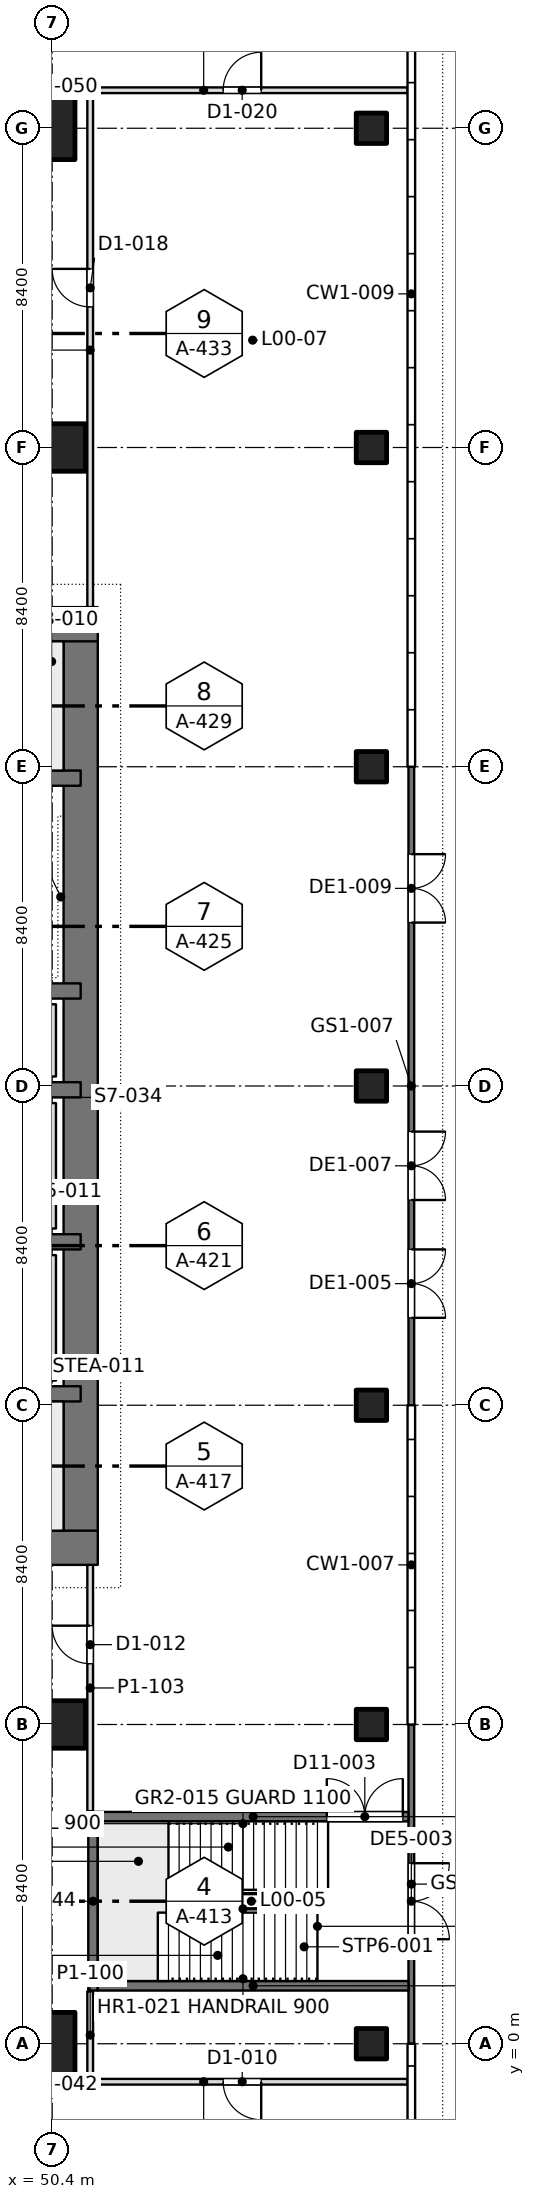
"""IFC4 building model, lengths in metres.
Left out: names, types, materials, properties, quantities, classifications, styles, units other than length and angle.
Written with IfcOpenShell. Run it as: python <this file> out.ifc"""

import sys

from ifc_helpers import new_model, si_unit, direction, frame, frame_2d, origin, origin_2d, place, context, subcontext, project, spatial, rectangle, extrude, element, fill, save


model = new_model("IFC4")
c1 = context("Model", 3, precision=1e-05, world=origin(), true_north=direction((0.0, 1.0)))
c2 = subcontext(c1, "Body", "Model", "MODEL_VIEW")
j1 = project(units=[si_unit("LENGTHUNIT", "METRE"), si_unit("PLANEANGLEUNIT", "RADIAN")], contexts=[c1])
p1 = place(None, origin())
s1 = spatial("IfcSite", under=j1, at=p1, CompositionType="ELEMENT")
p2 = place(p1, origin())
s2 = spatial("IfcBuilding", under=s1, at=p2, CompositionType="ELEMENT")
p3 = place(p2, origin())
s3 = spatial("IfcBuildingStorey", under=s2, at=p3, CompositionType="ELEMENT", Elevation=0.0)
p4 = place(p3, frame((50.4, 0.0, 0.0), z_axis=(0.0, 0.0, 1.0), x_axis=(1.0, 0.0, 0.0)))
e1 = element("IfcColumn", 1, at=p4, inside=s3, PredefinedType="COLUMN", context=c2, shape_type="SweptSolid", body=[
    extrude(rectangle(XDim=1.2, YDim=1.65, at=origin_2d()), origin(), (0.0, 0.0, 1.0), 5.4),
])
for number, where, z_axis, x_axis in (
    (2, (50.4, 8.4, 0.0), (0.0, 0.0, 1.0), (0.0, 1.0, 0.0)),
    (3, (50.4, 42.0, 0.0), (0.0, 0.0, 1.0), (0.0, 1.0, 0.0)),
):
    element("IfcColumn", number, at=place(p3, frame(where, z_axis=z_axis, x_axis=x_axis)), inside=s3, PredefinedType="COLUMN", context=c2, shape_type="SweptSolid", body=[
        extrude(rectangle(XDim=1.25, YDim=1.75, at=origin_2d()), origin(), (0.0, 0.0, 1.0), 5.4),
    ])
p5 = place(p3, frame((50.4, 50.4, 0.0), z_axis=(0.0, 0.0, 1.0), x_axis=(1.0, 0.0, 0.0)))
e4 = element("IfcColumn", 4, at=p5, inside=s3, PredefinedType="COLUMN", context=c2, shape_type="SweptSolid", body=[
    extrude(rectangle(XDim=1.2, YDim=1.65, at=origin_2d()), origin(), (0.0, 0.0, 1.0), 5.4),
])
for number, where, z_axis, x_axis in (
    (5, (58.8, 0.0, 0.0), (0.0, 0.0, 1.0), (1.0, 0.0, 0.0)),
    (6, (58.8, 8.4, 0.0), (0.0, 0.0, 1.0), (1.0, 0.0, 0.0)),
    (7, (58.8, 16.8, 0.0), (0.0, 0.0, 1.0), (1.0, 0.0, 0.0)),
    (8, (58.8, 25.2, 0.0), (0.0, 0.0, 1.0), (1.0, 0.0, 0.0)),
    (9, (58.8, 33.6, 0.0), (0.0, 0.0, 1.0), (1.0, 0.0, 0.0)),
    (10, (58.8, 42.0, 0.0), (0.0, 0.0, 1.0), (1.0, 0.0, 0.0)),
    (11, (58.8, 50.4, 0.0), (0.0, 0.0, 1.0), (1.0, 0.0, 0.0)),
):
    element("IfcColumn", number, at=place(p3, frame(where, z_axis=z_axis, x_axis=x_axis)), inside=s3, PredefinedType="COLUMN", context=c2, shape_type="SweptSolid", body=[
        extrude(rectangle(XDim=0.8, YDim=0.8, at=origin_2d()), origin(), (0.0, 0.0, 1.0), 5.4),
    ])
p6 = place(p3, frame((33.6, 13.05, 0.0), z_axis=(0.0, 0.0, 1.0), x_axis=(1.0, 0.0, 0.0)))
e12 = element("IfcWall", 12, at=p6, inside=s3, PredefinedType="SHEAR", context=c2, shape_type="SweptSolid", body=[
    extrude(rectangle(XDim=18.0, YDim=0.9, at=frame_2d((9.0, 0.0))), origin(), (0.0, 0.0, 1.0), 5.4),
])
p7 = place(p6, frame((7.25, 0.0, 0.0)))
e13 = element("IfcOpeningElement", 13, at=p7, cuts=e12, PredefinedType="OPENING", context=c2, shape_type="SweptSolid", body=[
    extrude(rectangle(XDim=1.8, YDim=2.4, at=frame_2d((0.9, 1.2))), frame((0.0, 0.46, 0.0), z_axis=(0.0, -1.0, 0.0), x_axis=(1.0, 0.0, 0.0)), (0.0, 0.0, 1.0), 0.92),
])
p8 = place(p3, frame((33.6, 37.35, 0.0), z_axis=(0.0, 0.0, 1.0), x_axis=(1.0, 0.0, 0.0)))
e14 = element("IfcWall", 14, at=p8, inside=s3, PredefinedType="SHEAR", context=c2, shape_type="SweptSolid", body=[
    extrude(rectangle(XDim=18.0, YDim=0.9, at=frame_2d((9.0, 0.0))), origin(), (0.0, 0.0, 1.0), 5.4),
])
p9 = place(p8, frame((7.25, 0.0, 0.0)))
e15 = element("IfcOpeningElement", 15, at=p9, cuts=e14, PredefinedType="OPENING", context=c2, shape_type="SweptSolid", body=[
    extrude(rectangle(XDim=1.8, YDim=2.4, at=frame_2d((0.9, 1.2))), frame((0.0, 0.46, 0.0), z_axis=(0.0, -1.0, 0.0), x_axis=(1.0, 0.0, 0.0)), (0.0, 0.0, 1.0), 0.92),
])
p10 = place(p3, frame((51.15, 13.05, 0.0), z_axis=(0.0, 0.0, 1.0), x_axis=(0.0, 1.0, 0.0)))
e16 = element("IfcWall", 16, at=p10, inside=s3, PredefinedType="SHEAR", context=c2, shape_type="SweptSolid", body=[
    extrude(rectangle(XDim=24.3, YDim=0.9, at=frame_2d((12.15, 0.0))), origin(), (0.0, 0.0, 1.0), 5.4),
])
for number, where, z_axis, x_axis in (
    (17, (51.15, 17.1, 0.0), (0.0, 0.0, 1.0), (-1.0, 0.0, 0.0)),
    (18, (51.15, 21.1, 0.0), (0.0, 0.0, 1.0), (-1.0, 0.0, 0.0)),
    (19, (51.15, 25.1, 0.0), (0.0, 0.0, 1.0), (-1.0, 0.0, 0.0)),
    (20, (51.15, 27.7, 0.0), (0.0, 0.0, 1.0), (-1.0, 0.0, 0.0)),
    (21, (51.15, 33.3, 0.0), (0.0, 0.0, 1.0), (-1.0, 0.0, 0.0)),
):
    element("IfcWall", number, at=place(p3, frame(where, z_axis=z_axis, x_axis=x_axis)), inside=s3, PredefinedType="SHEAR", context=c2, shape_type="SweptSolid", body=[
        extrude(rectangle(XDim=7.65, YDim=0.4, at=frame_2d((3.825, 0.0))), origin(), (0.0, 0.0, 1.0), 5.4),
    ])
p11 = place(p3, frame((59.85, 0.0, 0.0), z_axis=(0.0, 0.0, 1.0), x_axis=(0.0, 1.0, 0.0)))
e22 = element("IfcWall", 22, at=p11, inside=s3, PredefinedType="SOLIDWALL", context=c2, shape_type="SweptSolid", body=[
    extrude(rectangle(XDim=8.4, YDim=0.15, at=frame_2d((4.2, 0.0))), origin(), (0.0, 0.0, 1.0), 5.2),
])
p12 = place(p11, frame((2.75, 0.0, 0.0)))
e23 = element("IfcOpeningElement", 23, at=p12, cuts=e22, PredefinedType="OPENING", context=c2, shape_type="SweptSolid", body=[
    extrude(rectangle(XDim=2.0, YDim=2.4, at=frame_2d((1.0, 1.2))), frame((0.0, 0.085, 0.0), z_axis=(0.0, -1.0, 0.0), x_axis=(1.0, 0.0, 0.0)), (0.0, 0.0, 1.0), 0.17),
])
p13 = place(p3, frame((59.85, 16.8, 0.0), z_axis=(0.0, 0.0, 1.0), x_axis=(0.0, 1.0, 0.0)))
e24 = element("IfcWall", 24, at=p13, inside=s3, PredefinedType="SOLIDWALL", context=c2, shape_type="SweptSolid", body=[
    extrude(rectangle(XDim=16.8, YDim=0.15, at=frame_2d((8.4, 0.0))), origin(), (0.0, 0.0, 1.0), 5.2),
])
p14 = place(p13, frame((2.3, 0.0, 0.0)))
e25 = element("IfcOpeningElement", 25, at=p14, cuts=e24, PredefinedType="OPENING", context=c2, shape_type="SweptSolid", body=[
    extrude(rectangle(XDim=1.8, YDim=2.4, at=frame_2d((0.9, 1.2))), frame((0.0, 0.085, 0.0), z_axis=(0.0, -1.0, 0.0), x_axis=(1.0, 0.0, 0.0)), (0.0, 0.0, 1.0), 0.17),
])
p15 = place(p13, frame((5.4, 0.0, 0.0)))
e26 = element("IfcOpeningElement", 26, at=p15, cuts=e24, PredefinedType="OPENING", context=c2, shape_type="SweptSolid", body=[
    extrude(rectangle(XDim=1.8, YDim=2.4, at=frame_2d((0.9, 1.2))), frame((0.0, 0.085, 0.0), z_axis=(0.0, -1.0, 0.0), x_axis=(1.0, 0.0, 0.0)), (0.0, 0.0, 1.0), 0.17),
])
p16 = place(p13, frame((12.7, 0.0, 0.0)))
e27 = element("IfcOpeningElement", 27, at=p16, cuts=e24, PredefinedType="OPENING", context=c2, shape_type="SweptSolid", body=[
    extrude(rectangle(XDim=1.8, YDim=2.4, at=frame_2d((0.9, 1.2))), frame((0.0, 0.085, 0.0), z_axis=(0.0, -1.0, 0.0), x_axis=(1.0, 0.0, 0.0)), (0.0, 0.0, 1.0), 0.17),
])
p17 = place(p3, frame((49.02, -1.0, 0.0), z_axis=(0.0, 0.0, 1.0), x_axis=(1.0, 0.0, 0.0)))
e28 = element("IfcWall", 28, at=p17, inside=s3, PredefinedType="PARTITIONING", context=c2, shape_type="SweptSolid", body=[
    extrude(rectangle(XDim=10.732, YDim=0.15, at=frame_2d((5.366, 0.0))), origin(), (0.0, 0.0, 1.0), 4.6),
])
p18 = place(p17, frame((5.88, 0.0, 0.0)))
e29 = element("IfcOpeningElement", 29, at=p18, cuts=e28, PredefinedType="OPENING", context=c2, shape_type="SweptSolid", body=[
    extrude(rectangle(XDim=1.0, YDim=2.2, at=frame_2d((0.5, 1.1))), frame((0.0, 0.085, 0.0), z_axis=(0.0, -1.0, 0.0), x_axis=(1.0, 0.0, 0.0)), (0.0, 0.0, 1.0), 0.17),
])
p19 = place(p3, frame((49.02, 51.4, 0.0), z_axis=(0.0, 0.0, 1.0), x_axis=(1.0, 0.0, 0.0)))
e30 = element("IfcWall", 30, at=p19, inside=s3, PredefinedType="PARTITIONING", context=c2, shape_type="SweptSolid", body=[
    extrude(rectangle(XDim=10.732, YDim=0.15, at=frame_2d((5.366, 0.0))), origin(), (0.0, 0.0, 1.0), 4.6),
])
p20 = place(p19, frame((5.88, 0.0, 0.0)))
e31 = element("IfcOpeningElement", 31, at=p20, cuts=e30, PredefinedType="OPENING", context=c2, shape_type="SweptSolid", body=[
    extrude(rectangle(XDim=1.0, YDim=2.2, at=frame_2d((0.5, 1.1))), frame((0.0, 0.085, 0.0), z_axis=(0.0, -1.0, 0.0), x_axis=(1.0, 0.0, 0.0)), (0.0, 0.0, 1.0), 0.17),
])
p21 = place(p3, frame((51.4, -0.926, 0.0), z_axis=(0.0, 0.0, 1.0), x_axis=(0.0, 1.0, 0.0)))
e32 = element("IfcWall", 32, at=p21, inside=s3, PredefinedType="PARTITIONING", context=c2, shape_type="SweptSolid", body=[
    extrude(rectangle(XDim=2.306, YDim=0.15, at=frame_2d((1.153, 0.0))), origin(), (0.0, 0.0, 1.0), 4.6),
])
p22 = place(p3, frame((51.4, 6.12, 0.0), z_axis=(0.0, 0.0, 1.0), x_axis=(0.0, 1.0, 0.0)))
e33 = element("IfcWall", 33, at=p22, inside=s3, PredefinedType="PARTITIONING", context=c2, shape_type="SweptSolid", body=[
    extrude(rectangle(XDim=6.482, YDim=0.15, at=frame_2d((3.241, 0.0))), origin(), (0.0, 0.0, 1.0), 4.6),
])
p23 = place(p22, frame((3.88, 0.0, 0.0)))
e34 = element("IfcOpeningElement", 34, at=p23, cuts=e33, PredefinedType="OPENING", context=c2, shape_type="SweptSolid", body=[
    extrude(rectangle(XDim=1.0, YDim=2.2, at=frame_2d((0.5, 1.1))), frame((0.0, 0.085, 0.0), z_axis=(0.0, -1.0, 0.0), x_axis=(1.0, 0.0, 0.0)), (0.0, 0.0, 1.0), 0.17),
])
p24 = place(p3, frame((51.4, 37.8, 0.0), z_axis=(0.0, 0.0, 1.0), x_axis=(0.0, 1.0, 0.0)))
e35 = element("IfcWall", 35, at=p24, inside=s3, PredefinedType="PARTITIONING", context=c2, shape_type="SweptSolid", body=[
    extrude(rectangle(XDim=13.526, YDim=0.15, at=frame_2d((6.763, 0.0))), origin(), (0.0, 0.0, 1.0), 4.6),
])
p25 = place(p24, frame((7.9, 0.0, 0.0)))
e36 = element("IfcOpeningElement", 36, at=p25, cuts=e35, PredefinedType="OPENING", context=c2, shape_type="SweptSolid", body=[
    extrude(rectangle(XDim=1.0, YDim=2.2, at=frame_2d((0.5, 1.1))), frame((0.0, 0.085, 0.0), z_axis=(0.0, -1.0, 0.0), x_axis=(1.0, 0.0, 0.0)), (0.0, 0.0, 1.0), 0.17),
])
for number, where, z_axis, x_axis in (
    (37, (50.4, 17.45, 0.0), (0.0, 0.0, 1.0), (0.0, 1.0, 0.0)),
    (38, (50.4, 21.45, 0.0), (0.0, 0.0, 1.0), (0.0, 1.0, 0.0)),
):
    element("IfcWall", number, at=place(p3, frame(where, z_axis=z_axis, x_axis=x_axis)), inside=s3, PredefinedType="PLUMBINGWALL", context=c2, shape_type="SweptSolid", body=[
        extrude(rectangle(XDim=3.3, YDim=0.2, at=frame_2d((1.65, 0.0))), origin(), (0.0, 0.0, 1.0), 1.2),
    ])
p26 = place(p3, frame((50.4, 25.45, 0.0), z_axis=(0.0, 0.0, 1.0), x_axis=(0.0, 1.0, 0.0)))
e39 = element("IfcWall", 39, at=p26, inside=s3, PredefinedType="PLUMBINGWALL", context=c2, shape_type="SweptSolid", body=[
    extrude(rectangle(XDim=1.9, YDim=0.2, at=frame_2d((0.95, 0.0))), origin(), (0.0, 0.0, 1.0), 1.2),
])
p27 = place(p3, frame((59.776, 1.525, 0.0), z_axis=(0.0, 0.0, 1.0), x_axis=(-1.0, 0.0, 0.0)))
e40 = element("IfcWall", 40, at=p27, inside=s3, PredefinedType="SOLIDWALL", context=c2, shape_type="SweptSolid", body=[
    extrude(rectangle(XDim=8.176, YDim=0.25, at=frame_2d((4.088, 0.0))), origin(), (0.0, 0.0, 1.0), 5.4),
])
p28 = place(p3, frame((59.776, 5.975, 0.0), z_axis=(0.0, 0.0, 1.0), x_axis=(-1.0, 0.0, 0.0)))
e41 = element("IfcWall", 41, at=p28, inside=s3, PredefinedType="SOLIDWALL", context=c2, shape_type="SweptSolid", body=[
    extrude(rectangle(XDim=8.176, YDim=0.25, at=frame_2d((4.088, 0.0))), origin(), (0.0, 0.0, 1.0), 5.4),
])
p29 = place(p28, frame((0.15, 0.0, 0.0)))
e42 = element("IfcOpeningElement", 42, at=p29, cuts=e41, PredefinedType="OPENING", context=c2, shape_type="SweptSolid", body=[
    extrude(rectangle(XDim=2.0, YDim=2.2, at=frame_2d((1.0, 1.1))), frame((0.0, 0.135, 0.0), z_axis=(0.0, -1.0, 0.0), x_axis=(1.0, 0.0, 0.0)), (0.0, 0.0, 1.0), 0.27),
])
p30 = place(p3, frame((51.475, 1.4, 0.0), z_axis=(0.0, 0.0, 1.0), x_axis=(0.0, 1.0, 0.0)))
e43 = element("IfcWall", 43, at=p30, inside=s3, PredefinedType="SOLIDWALL", context=c2, shape_type="SweptSolid", body=[
    extrude(rectangle(XDim=4.7, YDim=0.25, at=frame_2d((2.35, 0.0))), origin(), (0.0, 0.0, 1.0), 5.4),
])
p31 = place(p12, frame((2.0, 0.0, 0.0), z_axis=(0.0, 0.0, 1.0), x_axis=(-1.0, 0.0, 0.0)))
e44 = element("IfcDoor", 44, at=p31, inside=s3, OperationType="DOUBLE_DOOR_SINGLE_SWING", PredefinedType="DOOR", context=c2, shape_type="SweptSolid", body=[
    extrude(rectangle(XDim=2.0, YDim=2.4, at=frame_2d((1.0, 1.2))), frame((0.0, 0.025, 0.0), z_axis=(0.0, -1.0, 0.0), x_axis=(1.0, 0.0, 0.0)), (0.0, 0.0, 1.0), 0.05),
])
fill(e23, e44)
p32 = place(p14, frame((1.8, 0.0, 0.0), z_axis=(0.0, 0.0, 1.0), x_axis=(-1.0, 0.0, 0.0)))
e45 = element("IfcDoor", 45, at=p32, inside=s3, OperationType="DOUBLE_DOOR_SINGLE_SWING", PredefinedType="DOOR", context=c2, shape_type="SweptSolid", body=[
    extrude(rectangle(XDim=1.8, YDim=2.4, at=frame_2d((0.9, 1.2))), frame((0.0, 0.025, 0.0), z_axis=(0.0, -1.0, 0.0), x_axis=(1.0, 0.0, 0.0)), (0.0, 0.0, 1.0), 0.05),
])
fill(e25, e45)
p33 = place(p15, frame((1.8, 0.0, 0.0), z_axis=(0.0, 0.0, 1.0), x_axis=(-1.0, 0.0, 0.0)))
e46 = element("IfcDoor", 46, at=p33, inside=s3, OperationType="DOUBLE_DOOR_SINGLE_SWING", PredefinedType="DOOR", context=c2, shape_type="SweptSolid", body=[
    extrude(rectangle(XDim=1.8, YDim=2.4, at=frame_2d((0.9, 1.2))), frame((0.0, 0.025, 0.0), z_axis=(0.0, -1.0, 0.0), x_axis=(1.0, 0.0, 0.0)), (0.0, 0.0, 1.0), 0.05),
])
fill(e26, e46)
p34 = place(p16, frame((1.8, 0.0, 0.0), z_axis=(0.0, 0.0, 1.0), x_axis=(-1.0, 0.0, 0.0)))
e47 = element("IfcDoor", 47, at=p34, inside=s3, OperationType="DOUBLE_DOOR_SINGLE_SWING", PredefinedType="DOOR", context=c2, shape_type="SweptSolid", body=[
    extrude(rectangle(XDim=1.8, YDim=2.4, at=frame_2d((0.9, 1.2))), frame((0.0, 0.025, 0.0), z_axis=(0.0, -1.0, 0.0), x_axis=(1.0, 0.0, 0.0)), (0.0, 0.0, 1.0), 0.05),
])
fill(e27, e47)
p35 = place(p18, frame((1.0, 0.0, 0.0), z_axis=(0.0, 0.0, 1.0), x_axis=(-1.0, 0.0, 0.0)))
e48 = element("IfcDoor", 48, at=p35, inside=s3, OperationType="SINGLE_SWING_LEFT", PredefinedType="DOOR", context=c2, shape_type="SweptSolid", body=[
    extrude(rectangle(XDim=1.0, YDim=2.2, at=frame_2d((0.5, 1.1))), frame((0.0, 0.025, 0.0), z_axis=(0.0, -1.0, 0.0), x_axis=(1.0, 0.0, 0.0)), (0.0, 0.0, 1.0), 0.05),
])
fill(e29, e48)
p36 = place(p20, origin())
e49 = element("IfcDoor", 49, at=p36, inside=s3, OperationType="SINGLE_SWING_RIGHT", PredefinedType="DOOR", context=c2, shape_type="SweptSolid", body=[
    extrude(rectangle(XDim=1.0, YDim=2.2, at=frame_2d((0.5, 1.1))), frame((0.0, 0.025, 0.0), z_axis=(0.0, -1.0, 0.0), x_axis=(1.0, 0.0, 0.0)), (0.0, 0.0, 1.0), 0.05),
])
fill(e31, e49)
p37 = place(p23, origin())
e50 = element("IfcDoor", 50, at=p37, inside=s3, OperationType="SINGLE_SWING_RIGHT", PredefinedType="DOOR", context=c2, shape_type="SweptSolid", body=[
    extrude(rectangle(XDim=1.0, YDim=2.2, at=frame_2d((0.5, 1.1))), frame((0.0, 0.025, 0.0), z_axis=(0.0, -1.0, 0.0), x_axis=(1.0, 0.0, 0.0)), (0.0, 0.0, 1.0), 0.05),
])
fill(e34, e50)
p38 = place(p25, origin())
e51 = element("IfcDoor", 51, at=p38, inside=s3, OperationType="SINGLE_SWING_RIGHT", PredefinedType="DOOR", context=c2, shape_type="SweptSolid", body=[
    extrude(rectangle(XDim=1.0, YDim=2.2, at=frame_2d((0.5, 1.1))), frame((0.0, 0.025, 0.0), z_axis=(0.0, -1.0, 0.0), x_axis=(1.0, 0.0, 0.0)), (0.0, 0.0, 1.0), 0.05),
])
fill(e36, e51)
p39 = place(p29, frame((2.0, 0.0, 0.0), z_axis=(0.0, 0.0, 1.0), x_axis=(-1.0, 0.0, 0.0)))
e52 = element("IfcDoor", 52, at=p39, inside=s3, OperationType="DOUBLE_DOOR_SINGLE_SWING", PredefinedType="DOOR", context=c2, shape_type="SweptSolid", body=[
    extrude(rectangle(XDim=2.0, YDim=2.2, at=frame_2d((1.0, 1.1))), frame((0.0, 0.025, 0.0), z_axis=(0.0, -1.0, 0.0), x_axis=(1.0, 0.0, 0.0)), (0.0, 0.0, 1.0), 0.05),
])
fill(e42, e52)
save(model, sys.argv[1])
